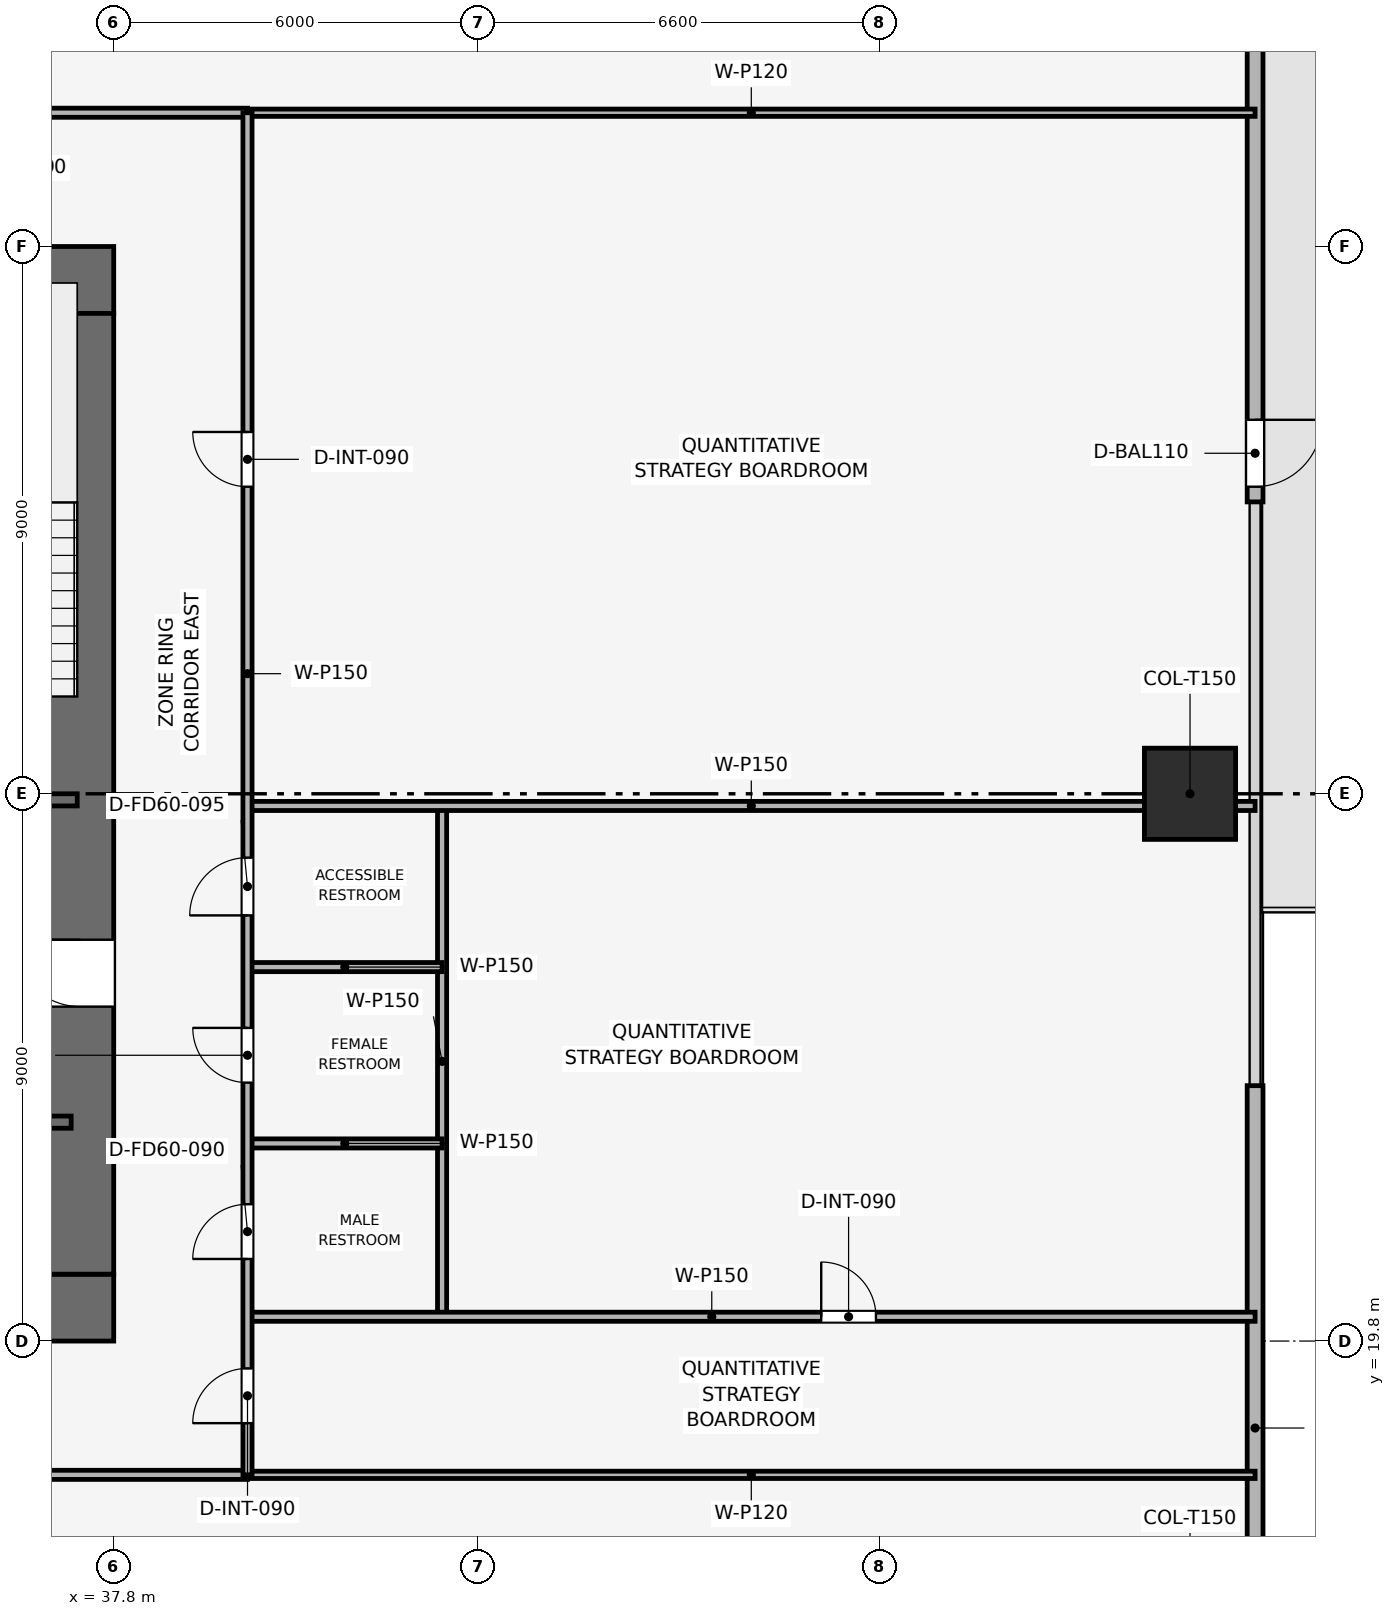
"""IFC4 building model, lengths in metres.
Left out: names, types, materials, properties, quantities, classifications, styles, units other than length and angle.
Written with IfcOpenShell. Run it as: python <this file> out.ifc"""

import sys

from ifc_helpers import new_model, si_unit, direction, frame, frame_2d, origin, origin_2d, place, context, subcontext, project, spatial, rectangle, extrude, element, fill, save


model = new_model("IFC4")
c1 = context("Model", 3, precision=1e-05, world=origin(), true_north=direction((0.0, 1.0)))
c2 = subcontext(c1, "Body", "Model", "MODEL_VIEW")
j1 = project(units=[si_unit("LENGTHUNIT", "METRE"), si_unit("PLANEANGLEUNIT", "RADIAN")], contexts=[c1])
p1 = place(None, origin())
s1 = spatial("IfcSite", under=j1, at=p1, CompositionType="ELEMENT")
p2 = place(p1, origin())
s2 = spatial("IfcBuilding", under=s1, at=p2, CompositionType="ELEMENT")
p3 = place(p2, frame((0.0, 0.0, 61.2)))
s3 = spatial("IfcBuildingStorey", under=s2, at=p3, CompositionType="ELEMENT", Elevation=61.2)
p4 = place(p3, frame((19.8, 20.35, 0.0), z_axis=(0.0, 0.0, 1.0), x_axis=(1.0, 0.0, 0.0)))
e1 = element("IfcWall", 1, at=p4, inside=s3, PredefinedType="SHEAR", context=c2, shape_type="SweptSolid", body=[
    extrude(rectangle(XDim=18.0, YDim=1.1, at=frame_2d((9.0, 0.0))), origin(), (0.0, 0.0, 1.0), 3.9),
])
p5 = place(p4, frame((8.4, 0.0, 0.0)))
e2 = element("IfcOpeningElement", 2, at=p5, cuts=e1, PredefinedType="OPENING", context=c2, shape_type="SweptSolid", body=[
    extrude(rectangle(XDim=1.2, YDim=2.2, at=frame_2d((0.6, 1.1))), frame((0.0, 0.56, 0.0), z_axis=(0.0, -1.0, 0.0), x_axis=(1.0, 0.0, 0.0)), (0.0, 0.0, 1.0), 1.12),
])
p6 = place(p3, frame((19.8, 37.25, 0.0), z_axis=(0.0, 0.0, 1.0), x_axis=(1.0, 0.0, 0.0)))
e3 = element("IfcWall", 3, at=p6, inside=s3, PredefinedType="SHEAR", context=c2, shape_type="SweptSolid", body=[
    extrude(rectangle(XDim=18.0, YDim=1.1, at=frame_2d((9.0, 0.0))), origin(), (0.0, 0.0, 1.0), 3.9),
])
p7 = place(p6, frame((7.05, 0.0, 0.0)))
e4 = element("IfcOpeningElement", 4, at=p7, cuts=e3, PredefinedType="OPENING", context=c2, shape_type="SweptSolid", body=[
    extrude(rectangle(XDim=1.1, YDim=2.15, at=frame_2d((0.55, 1.075))), frame((0.0, 0.56, 0.0), z_axis=(0.0, -1.0, 0.0), x_axis=(1.0, 0.0, 0.0)), (0.0, 0.0, 1.0), 1.12),
])
p8 = place(p3, frame((37.25, 20.9, 0.0), z_axis=(0.0, 0.0, 1.0), x_axis=(0.0, 1.0, 0.0)))
e5 = element("IfcWall", 5, at=p8, inside=s3, PredefinedType="SHEAR", context=c2, shape_type="SweptSolid", body=[
    extrude(rectangle(XDim=15.8, YDim=1.1, at=frame_2d((7.9, 0.0))), origin(), (0.0, 0.0, 1.0), 3.9),
])
p9 = place(p8, frame((4.4, 0.0, 0.0)))
e6 = element("IfcOpeningElement", 6, at=p9, cuts=e5, PredefinedType="OPENING", context=c2, shape_type="SweptSolid", body=[
    extrude(rectangle(XDim=1.1, YDim=2.15, at=frame_2d((0.55, 1.075))), frame((0.0, 0.56, 0.0), z_axis=(0.0, -1.0, 0.0), x_axis=(1.0, 0.0, 0.0)), (0.0, 0.0, 1.0), 1.12),
])
p10 = place(p3, frame((55.5, 28.8, 0.003), z_axis=(0.0, 0.0, 1.0), x_axis=(1.0, 0.0, 0.0)))
e7 = element("IfcColumn", 7, at=p10, inside=s3, PredefinedType="COLUMN", context=c2, shape_type="SweptSolid", body=[
    extrude(rectangle(XDim=1.5, YDim=1.5, at=origin_2d()), origin(), (0.0, 0.0, 1.0), 3.644),
])
p11 = place(p3, frame((56.57, 48.9, 0.0), z_axis=(0.0, 0.0, 1.0), x_axis=(0.0, -1.0, 0.0)))
e8 = element("IfcWall", 8, at=p11, inside=s3, PredefinedType="SOLIDWALL", context=c2, shape_type="SweptSolid", body=[
    extrude(rectangle(XDim=15.3, YDim=0.26, at=frame_2d((7.65, 0.0))), origin(), (0.0, 0.0, 1.0), 3.65),
])
p12 = place(p11, frame((13.95, 0.0, 0.0)))
e9 = element("IfcOpeningElement", 9, at=p12, cuts=e8, PredefinedType="OPENING", context=c2, shape_type="SweptSolid", body=[
    extrude(rectangle(XDim=1.1, YDim=2.2, at=frame_2d((0.55, 1.1))), frame((0.0, 0.14, 0.0), z_axis=(0.0, -1.0, 0.0), x_axis=(1.0, 0.0, 0.0)), (0.0, 0.0, 1.0), 0.28),
])
p13 = place(p3, frame((56.57, 24.0, 0.0), z_axis=(0.0, 0.0, 1.0), x_axis=(0.0, -1.0, 0.0)))
e10 = element("IfcWall", 10, at=p13, inside=s3, PredefinedType="SOLIDWALL", context=c2, shape_type="SweptSolid", body=[
    extrude(rectangle(XDim=15.3, YDim=0.26, at=frame_2d((7.65, 0.0))), origin(), (0.0, 0.0, 1.0), 3.65),
])
p14 = place(p13, frame((11.25, 0.0, 0.9)))
e11 = element("IfcOpeningElement", 11, at=p14, cuts=e10, PredefinedType="OPENING", context=c2, shape_type="SweptSolid", body=[
    extrude(rectangle(XDim=3.8, YDim=1.9, at=frame_2d((1.9, 0.95))), frame((0.0, 0.14, 0.0), z_axis=(0.0, -1.0, 0.0), x_axis=(1.0, 0.0, 0.0)), (0.0, 0.0, 1.0), 0.28),
])
p15 = place(p3, frame((34.05, 28.7, 0.0), z_axis=(0.0, 0.0, 1.0), x_axis=(1.0, 0.0, 0.0)))
e12 = element("IfcWall", 12, at=p15, inside=s3, PredefinedType="SHEAR", context=c2, shape_type="SweptSolid", body=[
    extrude(rectangle(XDim=3.15, YDim=0.2, at=frame_2d((1.575, 0.0))), origin(), (0.0, 0.0, 1.0), 3.65),
])
p16 = place(p15, frame((0.8, 0.0, 0.0)))
e13 = element("IfcOpeningElement", 13, at=p16, cuts=e12, PredefinedType="OPENING", context=c2, shape_type="SweptSolid", body=[
    extrude(rectangle(XDim=1.0, YDim=2.1, at=frame_2d((0.5, 1.05))), frame((0.0, 0.11, 0.0), z_axis=(0.0, -1.0, 0.0), x_axis=(1.0, 0.0, 0.0)), (0.0, 0.0, 1.0), 0.22),
])
p17 = place(p3, frame((34.05, 23.4, 0.0), z_axis=(0.0, 0.0, 1.0), x_axis=(1.0, 0.0, 0.0)))
e14 = element("IfcWall", 14, at=p17, inside=s3, PredefinedType="SHEAR", context=c2, shape_type="SweptSolid", body=[
    extrude(rectangle(XDim=3.05, YDim=0.2, at=frame_2d((1.525, 0.0))), origin(), (0.0, 0.0, 1.0), 3.65),
])
p18 = place(p17, frame((1.2, 0.0, 0.0)))
e15 = element("IfcOpeningElement", 15, at=p18, cuts=e14, PredefinedType="OPENING", context=c2, shape_type="SweptSolid", body=[
    extrude(rectangle(XDim=1.1, YDim=2.15, at=frame_2d((0.55, 1.075))), frame((0.0, 0.11, 0.0), z_axis=(0.0, -1.0, 0.0), x_axis=(1.0, 0.0, 0.0)), (0.0, 0.0, 1.0), 0.22),
])
for number, where, z_axis, x_axis in (
    (16, (40.0, 17.6, 0.0), (0.0, 0.0, 1.0), (1.0, 0.0, 0.0)),
    (17, (40.0, 40.0, 0.0), (0.0, 0.0, 1.0), (1.0, 0.0, 0.0)),
):
    element("IfcWall", number, at=place(p3, frame(where, z_axis=z_axis, x_axis=x_axis)), inside=s3, PredefinedType="PARTITIONING", context=c2, shape_type="SweptSolid", body=[
        extrude(rectangle(XDim=16.57, YDim=0.12, at=frame_2d((8.285, 0.0))), origin(), (0.0, 0.0, 1.0), 2.935),
    ])
p19 = place(p3, frame((43.2, 20.2, 0.0), z_axis=(0.0, 0.0, 1.0), x_axis=(0.0, 1.0, 0.0)))
e18 = element("IfcWall", 18, at=p19, inside=s3, PredefinedType="PARTITIONING", context=c2, shape_type="SweptSolid", body=[
    extrude(rectangle(XDim=8.4, YDim=0.15, at=frame_2d((4.2, 0.0))), origin(), (0.0, 0.0, 1.0), 3.085),
])
p20 = place(p3, frame((40.0, 20.2, 0.0), z_axis=(0.0, 0.0, 1.0), x_axis=(1.0, 0.0, 0.0)))
e19 = element("IfcWall", 19, at=p20, inside=s3, PredefinedType="PARTITIONING", context=c2, shape_type="SweptSolid", body=[
    extrude(rectangle(XDim=16.57, YDim=0.15, at=frame_2d((8.285, 0.0))), origin(), (0.0, 0.0, 1.0), 2.935),
])
p21 = place(p20, frame((9.435, 0.0, 0.0)))
e20 = element("IfcOpeningElement", 20, at=p21, cuts=e19, PredefinedType="OPENING", context=c2, shape_type="SweptSolid", body=[
    extrude(rectangle(XDim=0.9, YDim=2.1, at=frame_2d((0.45, 1.05))), frame((0.0, 0.085, 0.0), z_axis=(0.0, -1.0, 0.0), x_axis=(1.0, 0.0, 0.0)), (0.0, 0.0, 1.0), 0.17),
])
p22 = place(p3, frame((40.0, 28.6, 0.0), z_axis=(0.0, 0.0, 1.0), x_axis=(1.0, 0.0, 0.0)))
e21 = element("IfcWall", 21, at=p22, inside=s3, PredefinedType="PARTITIONING", context=c2, shape_type="SweptSolid", body=[
    extrude(rectangle(XDim=16.57, YDim=0.15, at=frame_2d((8.285, 0.0))), origin(), (0.0, 0.0, 1.0), 2.935),
])
for number, where, z_axis, x_axis in (
    (22, (40.0, 23.05, 0.0), (0.0, 0.0, 1.0), (1.0, 0.0, 0.0)),
    (23, (40.0, 25.95, 0.0), (0.0, 0.0, 1.0), (1.0, 0.0, 0.0)),
):
    element("IfcWall", number, at=place(p3, frame(where, z_axis=z_axis, x_axis=x_axis)), inside=s3, PredefinedType="PARTITIONING", context=c2, shape_type="SweptSolid", body=[
        extrude(rectangle(XDim=3.2, YDim=0.15, at=frame_2d((1.6, 0.0))), origin(), (0.0, 0.0, 1.0), 3.65),
    ])
p23 = place(p3, frame((17.6, 17.6, 0.0), z_axis=(0.0, 0.0, 1.0), x_axis=(1.0, 0.0, 0.0)))
e24 = element("IfcWall", 24, at=p23, inside=s3, PredefinedType="PARTITIONING", context=c2, shape_type="SweptSolid", body=[
    extrude(rectangle(XDim=22.4, YDim=0.15, at=frame_2d((11.2, 0.0))), origin(), (0.0, 0.0, 1.0), 3.085),
])
p24 = place(p23, frame((0.72, 0.0, 0.0)))
e25 = element("IfcOpeningElement", 25, at=p24, cuts=e24, PredefinedType="OPENING", context=c2, shape_type="SweptSolid", body=[
    extrude(rectangle(XDim=0.9, YDim=2.1, at=frame_2d((0.45, 1.05))), frame((0.0, 0.085, 0.0), z_axis=(0.0, -1.0, 0.0), x_axis=(1.0, 0.0, 0.0)), (0.0, 0.0, 1.0), 0.17),
])
p25 = place(p23, frame((6.255, 0.0, 0.0)))
e26 = element("IfcOpeningElement", 26, at=p25, cuts=e24, PredefinedType="OPENING", context=c2, shape_type="SweptSolid", body=[
    extrude(rectangle(XDim=0.9, YDim=2.1, at=frame_2d((0.45, 1.05))), frame((0.0, 0.085, 0.0), z_axis=(0.0, -1.0, 0.0), x_axis=(1.0, 0.0, 0.0)), (0.0, 0.0, 1.0), 0.17),
])
p26 = place(p23, frame((16.285, 0.0, 0.0)))
e27 = element("IfcOpeningElement", 27, at=p26, cuts=e24, PredefinedType="OPENING", context=c2, shape_type="SweptSolid", body=[
    extrude(rectangle(XDim=0.9, YDim=2.1, at=frame_2d((0.45, 1.05))), frame((0.0, 0.085, 0.0), z_axis=(0.0, -1.0, 0.0), x_axis=(1.0, 0.0, 0.0)), (0.0, 0.0, 1.0), 0.17),
])
p27 = place(p3, frame((17.6, 40.0, 0.0), z_axis=(0.0, 0.0, 1.0), x_axis=(1.0, 0.0, 0.0)))
e28 = element("IfcWall", 28, at=p27, inside=s3, PredefinedType="PARTITIONING", context=c2, shape_type="SweptSolid", body=[
    extrude(rectangle(XDim=22.4, YDim=0.15, at=frame_2d((11.2, 0.0))), origin(), (0.0, 0.0, 1.0), 3.085),
])
p28 = place(p27, frame((0.7, 0.0, 0.0)))
e29 = element("IfcOpeningElement", 29, at=p28, cuts=e28, PredefinedType="OPENING", context=c2, shape_type="SweptSolid", body=[
    extrude(rectangle(XDim=0.9, YDim=2.1, at=frame_2d((0.45, 1.05))), frame((0.0, 0.085, 0.0), z_axis=(0.0, -1.0, 0.0), x_axis=(1.0, 0.0, 0.0)), (0.0, 0.0, 1.0), 0.17),
])
p29 = place(p27, frame((4.888, 0.0, 0.0)))
e30 = element("IfcOpeningElement", 30, at=p29, cuts=e28, PredefinedType="OPENING", context=c2, shape_type="SweptSolid", body=[
    extrude(rectangle(XDim=0.9, YDim=2.1, at=frame_2d((0.45, 1.05))), frame((0.0, 0.085, 0.0), z_axis=(0.0, -1.0, 0.0), x_axis=(1.0, 0.0, 0.0)), (0.0, 0.0, 1.0), 0.17),
])
p30 = place(p27, frame((10.808, 0.0, 0.0)))
e31 = element("IfcOpeningElement", 31, at=p30, cuts=e28, PredefinedType="OPENING", context=c2, shape_type="SweptSolid", body=[
    extrude(rectangle(XDim=0.9, YDim=2.1, at=frame_2d((0.45, 1.05))), frame((0.0, 0.085, 0.0), z_axis=(0.0, -1.0, 0.0), x_axis=(1.0, 0.0, 0.0)), (0.0, 0.0, 1.0), 0.17),
])
p31 = place(p27, frame((17.82, 0.0, 0.0)))
e32 = element("IfcOpeningElement", 32, at=p31, cuts=e28, PredefinedType="OPENING", context=c2, shape_type="SweptSolid", body=[
    extrude(rectangle(XDim=0.9, YDim=2.1, at=frame_2d((0.45, 1.05))), frame((0.0, 0.085, 0.0), z_axis=(0.0, -1.0, 0.0), x_axis=(1.0, 0.0, 0.0)), (0.0, 0.0, 1.0), 0.17),
])
p32 = place(p3, frame((40.0, 17.6, 0.0), z_axis=(0.0, 0.0, 1.0), x_axis=(0.0, 1.0, 0.0)))
e33 = element("IfcWall", 33, at=p32, inside=s3, PredefinedType="PARTITIONING", context=c2, shape_type="SweptSolid", body=[
    extrude(rectangle(XDim=22.4, YDim=0.15, at=frame_2d((11.2, 0.0))), origin(), (0.0, 0.0, 1.0), 3.085),
])
p33 = place(p32, frame((0.85, 0.0, 0.0)))
e34 = element("IfcOpeningElement", 34, at=p33, cuts=e33, PredefinedType="OPENING", context=c2, shape_type="SweptSolid", body=[
    extrude(rectangle(XDim=0.9, YDim=2.1, at=frame_2d((0.45, 1.05))), frame((0.0, 0.085, 0.0), z_axis=(0.0, -1.0, 0.0), x_axis=(1.0, 0.0, 0.0)), (0.0, 0.0, 1.0), 0.17),
])
p34 = place(p32, frame((3.55, 0.0, 0.0)))
e35 = element("IfcOpeningElement", 35, at=p34, cuts=e33, PredefinedType="OPENING", context=c2, shape_type="SweptSolid", body=[
    extrude(rectangle(XDim=0.9, YDim=2.1, at=frame_2d((0.45, 1.05))), frame((0.0, 0.085, 0.0), z_axis=(0.0, -1.0, 0.0), x_axis=(1.0, 0.0, 0.0)), (0.0, 0.0, 1.0), 0.17),
])
p35 = place(p32, frame((6.45, 0.0, 0.0)))
e36 = element("IfcOpeningElement", 36, at=p35, cuts=e33, PredefinedType="OPENING", context=c2, shape_type="SweptSolid", body=[
    extrude(rectangle(XDim=0.9, YDim=2.1, at=frame_2d((0.45, 1.05))), frame((0.0, 0.085, 0.0), z_axis=(0.0, -1.0, 0.0), x_axis=(1.0, 0.0, 0.0)), (0.0, 0.0, 1.0), 0.17),
])
p36 = place(p32, frame((9.2, 0.0, 0.0)))
e37 = element("IfcOpeningElement", 37, at=p36, cuts=e33, PredefinedType="OPENING", context=c2, shape_type="SweptSolid", body=[
    extrude(rectangle(XDim=0.95, YDim=2.1, at=frame_2d((0.475, 1.05))), frame((0.0, 0.085, 0.0), z_axis=(0.0, -1.0, 0.0), x_axis=(1.0, 0.0, 0.0)), (0.0, 0.0, 1.0), 0.17),
])
p37 = place(p32, frame((16.25, 0.0, 0.0)))
e38 = element("IfcOpeningElement", 38, at=p37, cuts=e33, PredefinedType="OPENING", context=c2, shape_type="SweptSolid", body=[
    extrude(rectangle(XDim=0.9, YDim=2.1, at=frame_2d((0.45, 1.05))), frame((0.0, 0.085, 0.0), z_axis=(0.0, -1.0, 0.0), x_axis=(1.0, 0.0, 0.0)), (0.0, 0.0, 1.0), 0.17),
])
p38 = place(p12, origin())
e39 = element("IfcDoor", 39, at=p38, inside=s3, OperationType="SINGLE_SWING_LEFT", PredefinedType="DOOR", context=c2, shape_type="SweptSolid", body=[
    extrude(rectangle(XDim=1.1, YDim=2.2, at=frame_2d((0.55, 1.1))), frame((0.0, 0.025, 0.0), z_axis=(0.0, -1.0, 0.0), x_axis=(1.0, 0.0, 0.0)), (0.0, 0.0, 1.0), 0.05),
])
fill(e9, e39)
p39 = place(p21, origin())
e40 = element("IfcDoor", 40, at=p39, inside=s3, OperationType="SINGLE_SWING_LEFT", PredefinedType="DOOR", context=c2, shape_type="SweptSolid", body=[
    extrude(rectangle(XDim=0.9, YDim=2.1, at=frame_2d((0.45, 1.05))), frame((0.0, 0.025, 0.0), z_axis=(0.0, -1.0, 0.0), x_axis=(1.0, 0.0, 0.0)), (0.0, 0.0, 1.0), 0.05),
])
fill(e20, e40)
p40 = place(p33, origin())
e41 = element("IfcDoor", 41, at=p40, inside=s3, OperationType="SINGLE_SWING_LEFT", PredefinedType="DOOR", context=c2, shape_type="SweptSolid", body=[
    extrude(rectangle(XDim=0.9, YDim=2.1, at=frame_2d((0.45, 1.05))), frame((0.0, 0.025, 0.0), z_axis=(0.0, -1.0, 0.0), x_axis=(1.0, 0.0, 0.0)), (0.0, 0.0, 1.0), 0.05),
])
fill(e34, e41)
p41 = place(p34, origin())
e42 = element("IfcDoor", 42, at=p41, inside=s3, OperationType="SINGLE_SWING_LEFT", PredefinedType="DOOR", context=c2, shape_type="SweptSolid", body=[
    extrude(rectangle(XDim=0.9, YDim=2.1, at=frame_2d((0.45, 1.05))), frame((0.0, 0.025, 0.0), z_axis=(0.0, -1.0, 0.0), x_axis=(1.0, 0.0, 0.0)), (0.0, 0.0, 1.0), 0.05),
])
fill(e35, e42)
p42 = place(p35, origin())
e43 = element("IfcDoor", 43, at=p42, inside=s3, OperationType="SINGLE_SWING_RIGHT", PredefinedType="DOOR", context=c2, shape_type="SweptSolid", body=[
    extrude(rectangle(XDim=0.9, YDim=2.1, at=frame_2d((0.45, 1.05))), frame((0.0, 0.025, 0.0), z_axis=(0.0, -1.0, 0.0), x_axis=(1.0, 0.0, 0.0)), (0.0, 0.0, 1.0), 0.05),
])
fill(e36, e43)
p43 = place(p36, origin())
e44 = element("IfcDoor", 44, at=p43, inside=s3, OperationType="SINGLE_SWING_LEFT", PredefinedType="DOOR", context=c2, shape_type="SweptSolid", body=[
    extrude(rectangle(XDim=0.95, YDim=2.1, at=frame_2d((0.475, 1.05))), frame((0.0, 0.025, 0.0), z_axis=(0.0, -1.0, 0.0), x_axis=(1.0, 0.0, 0.0)), (0.0, 0.0, 1.0), 0.05),
])
fill(e37, e44)
p44 = place(p37, origin())
e45 = element("IfcDoor", 45, at=p44, inside=s3, OperationType="SINGLE_SWING_RIGHT", PredefinedType="DOOR", context=c2, shape_type="SweptSolid", body=[
    extrude(rectangle(XDim=0.9, YDim=2.1, at=frame_2d((0.45, 1.05))), frame((0.0, 0.025, 0.0), z_axis=(0.0, -1.0, 0.0), x_axis=(1.0, 0.0, 0.0)), (0.0, 0.0, 1.0), 0.05),
])
fill(e38, e45)
p45 = place(p9, origin())
e46 = element("IfcDoor", 46, at=p45, inside=s3, OperationType="SINGLE_SWING_RIGHT", PredefinedType="DOOR", context=c2, shape_type="SweptSolid", body=[
    extrude(rectangle(XDim=1.1, YDim=2.15, at=frame_2d((0.55, 1.075))), frame((0.0, 0.025, 0.0), z_axis=(0.0, -1.0, 0.0), x_axis=(1.0, 0.0, 0.0)), (0.0, 0.0, 1.0), 0.05),
])
fill(e6, e46)
save(model, sys.argv[1])
